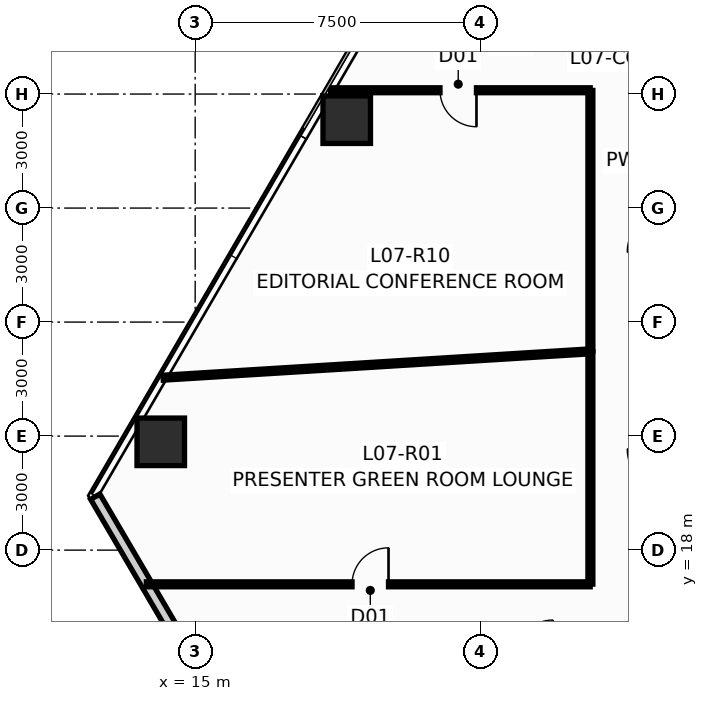
"""IFC4 building model, lengths in metres.
Left out: names, types, materials, properties, quantities, classifications, styles, units other than length and angle.
Written with IfcOpenShell. Run it as: python <this file> out.ifc"""

import sys

from ifc_helpers import new_model, si_unit, direction, frame, frame_2d, origin, origin_2d, place, context, subcontext, project, spatial, rectangle, hollow_rectangle, extrude, source, transform, mapped, element, fill, save


model = new_model("IFC4")
c1 = context("Model", 3, precision=1e-05, world=origin(), true_north=direction((0.0, 1.0)))
c2 = subcontext(c1, "Body", "Model", "MODEL_VIEW")
j1 = project(units=[si_unit("LENGTHUNIT", "METRE"), si_unit("PLANEANGLEUNIT", "RADIAN")], contexts=[c1])
p1 = place(None, origin())
s1 = spatial("IfcSite", under=j1, at=p1, CompositionType="ELEMENT")
p2 = place(p1, origin())
s2 = spatial("IfcBuilding", under=s1, at=p2, CompositionType="ELEMENT")
p3 = place(p2, frame((0.0, 0.0, 31.25)))
s3 = spatial("IfcBuildingStorey", under=s2, at=p3, CompositionType="ELEMENT", Elevation=31.25)
m1 = source(origin(), c2, "Body", "SweptSolid", [
    extrude(hollow_rectangle(XDim=1.25, YDim=1.25, WallThickness=0.07, at=origin_2d()), origin(), (0.0, 0.0, 1.0), 3.651),
])
p4 = place(p3, frame((18.988, 29.326, 0.0), z_axis=(0.014913313399, -0.013776424037, 0.999793880369), x_axis=(0.678553674548, 0.734550822447, 0.0)))
e1 = element("IfcColumn", 1, at=p4, inside=s3, PredefinedType="COLUMN", context=c2, shape_type="MappedRepresentation", body=[
    mapped(m1, transform((0.0, 0.0, 0.0), scale=1.0)),
])
m2 = source(origin(), c2, "Body", "SweptSolid", [
    extrude(hollow_rectangle(XDim=1.25, YDim=1.25, WallThickness=0.07, at=origin_2d()), origin(), (0.0, 0.0, 1.0), 3.651),
])
p5 = place(p3, frame((14.094, 20.849, 0.0), z_axis=(0.010364917199, -0.021599150033, 0.999712981415), x_axis=(0.901566609123, 0.432640323264, 0.0)))
e2 = element("IfcColumn", 2, at=p5, inside=s3, PredefinedType="COLUMN", context=c2, shape_type="MappedRepresentation", body=[
    mapped(m2, transform((0.0, 0.0, 0.0), scale=1.0)),
])
p6 = place(p3, frame((21.41, 3.982, 0.0), z_axis=(0.0, 0.0, 1.0), x_axis=(-0.505640292847, 0.862744396823, 0.0)))
e3 = element("IfcWall", 3, at=p6, inside=s3, PredefinedType="STANDARD", context=c2, shape_type="SweptSolid", body=[
    extrude(rectangle(XDim=17.878, YDim=0.28, at=frame_2d((8.939, 0.0))), origin(), (0.0, 0.0, 1.0), 3.4),
])
p7 = place(p6, frame((8.04, 0.0, 0.9)))
e4 = element("IfcOpeningElement", 4, at=p7, cuts=e3, PredefinedType="OPENING", context=c2, shape_type="SweptSolid", body=[
    extrude(rectangle(XDim=1.8, YDim=1.8, at=frame_2d((0.9, 0.9))), frame((0.0, 0.152, 0.0), z_axis=(0.0, -1.0, 0.0), x_axis=(1.0, 0.0, 0.0)), (0.0, 0.0, 1.0), 0.304),
])
p8 = place(p3, frame((13.716, 17.1, 0.0), z_axis=(0.0, 0.0, 1.0), x_axis=(1.0, 0.0, 0.0)))
e5 = element("IfcWall", 5, at=p8, inside=s3, PredefinedType="PARTITIONING", context=c2, shape_type="SweptSolid", body=[
    extrude(rectangle(XDim=11.679, YDim=0.13, at=frame_2d((5.84, 0.0))), origin(), (0.0, 0.0, 1.0), 3.4),
])
p9 = place(p8, frame((5.412, 0.0, 0.0)))
e6 = element("IfcOpeningElement", 6, at=p9, cuts=e5, PredefinedType="OPENING", context=c2, shape_type="SweptSolid", body=[
    extrude(rectangle(XDim=0.96, YDim=2.15, at=frame_2d((0.48, 1.075))), frame((0.0, 0.077, 0.0), z_axis=(0.0, -1.0, 0.0), x_axis=(1.0, 0.0, 0.0)), (0.0, 0.0, 1.0), 0.154),
])
p10 = place(p3, frame((14.157, 22.537, 0.0), z_axis=(0.0, 0.0, 1.0), x_axis=(0.998102122672, 0.061580457266, 0.0)))
e7 = element("IfcWall", 7, at=p10, inside=s3, PredefinedType="PARTITIONING", context=c2, shape_type="SweptSolid", body=[
    extrude(rectangle(XDim=11.26, YDim=0.13, at=frame_2d((5.63, 0.0))), origin(), (0.0, 0.0, 1.0), 3.4),
])
p11 = place(p3, frame((25.395, 30.1, 0.0), z_axis=(0.0, 0.0, 1.0), x_axis=(-1.0, 0.0, 0.0)))
e8 = element("IfcWall", 8, at=p11, inside=s3, PredefinedType="PARTITIONING", context=c2, shape_type="SweptSolid", body=[
    extrude(rectangle(XDim=6.833, YDim=0.13, at=frame_2d((3.417, 0.0))), origin(), (0.0, 0.0, 1.0), 2.783),
])
p12 = place(p11, frame((2.993, 0.0, 0.0)))
e9 = element("IfcOpeningElement", 9, at=p12, cuts=e8, PredefinedType="OPENING", context=c2, shape_type="SweptSolid", body=[
    extrude(rectangle(XDim=0.96, YDim=2.15, at=frame_2d((0.48, 1.075))), frame((0.0, 0.077, 0.0), z_axis=(0.0, -1.0, 0.0), x_axis=(1.0, 0.0, 0.0)), (0.0, 0.0, 1.0), 0.154),
])
p13 = place(p3, frame((25.4, 23.235, 0.0), z_axis=(0.0, 0.0, 1.0), x_axis=(0.0, 1.0, 0.0)))
e10 = element("IfcWall", 10, at=p13, inside=s3, PredefinedType="PARTITIONING", context=c2, shape_type="SweptSolid", body=[
    extrude(rectangle(XDim=6.86, YDim=0.13, at=frame_2d((3.43, 0.0))), origin(), (0.0, 0.0, 1.0), 3.026),
])
p14 = place(p3, frame((25.4, 17.105, 0.0), z_axis=(0.0, 0.0, 1.0), x_axis=(0.0, 1.0, 0.0)))
e11 = element("IfcWall", 11, at=p14, inside=s3, PredefinedType="PARTITIONING", context=c2, shape_type="SweptSolid", body=[
    extrude(rectangle(XDim=6.12, YDim=0.13, at=frame_2d((3.06, 0.0))), origin(), (0.0, 0.0, 1.0), 3.026),
])
p15 = place(p9, origin())
e12 = element("IfcDoor", 12, at=p15, inside=s3, OperationType="SINGLE_SWING_RIGHT", PredefinedType="DOOR", context=c2, shape_type="SweptSolid", body=[
    extrude(rectangle(XDim=0.96, YDim=2.15, at=frame_2d((0.48, 1.075))), frame((0.0, 0.025, 0.0), z_axis=(0.0, -1.0, 0.0), x_axis=(1.0, 0.0, 0.0)), (0.0, 0.0, 1.0), 0.05),
])
fill(e6, e12)
p16 = place(p12, origin())
e13 = element("IfcDoor", 13, at=p16, inside=s3, OperationType="SINGLE_SWING_LEFT", PredefinedType="DOOR", context=c2, shape_type="SweptSolid", body=[
    extrude(rectangle(XDim=0.96, YDim=2.15, at=frame_2d((0.48, 1.075))), frame((0.0, 0.025, 0.0), z_axis=(0.0, -1.0, 0.0), x_axis=(1.0, 0.0, 0.0)), (0.0, 0.0, 1.0), 0.05),
])
fill(e9, e13)
save(model, sys.argv[1])
